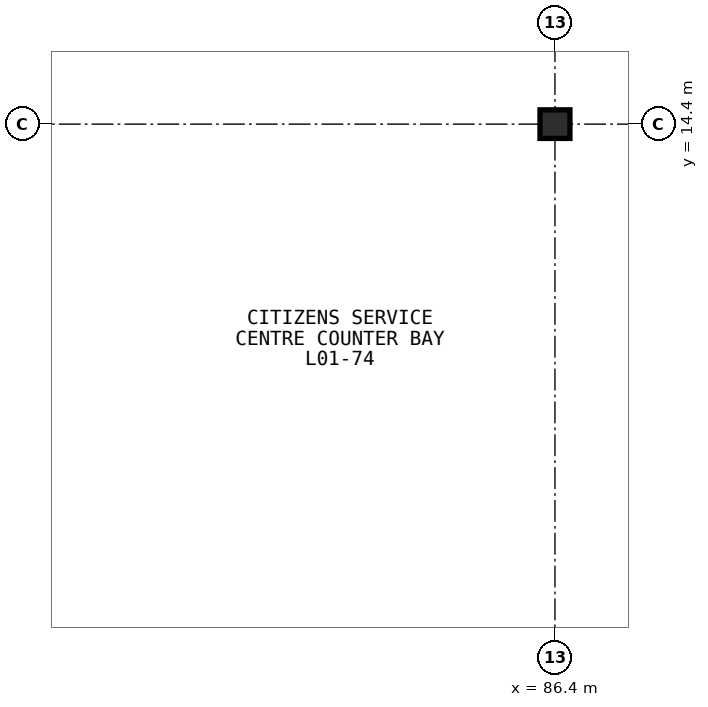
"""IFC4 building model, lengths in metres.
Left out: names, types, materials, properties, quantities, classifications, styles, units other than length and angle.
Written with IfcOpenShell. Run it as: python <this file> out.ifc"""

import sys

from ifc_helpers import new_model, si_unit, direction, frame, origin, origin_2d, place, context, subcontext, project, spatial, i_section, extrude, element, save


model = new_model("IFC4")
c1 = context("Model", 3, precision=1e-05, world=origin(), true_north=direction((0.0, 1.0)))
c2 = subcontext(c1, "Body", "Model", "MODEL_VIEW")
j1 = project(units=[si_unit("LENGTHUNIT", "METRE"), si_unit("PLANEANGLEUNIT", "RADIAN")], contexts=[c1])
p1 = place(None, origin())
s1 = spatial("IfcSite", under=j1, at=p1, CompositionType="ELEMENT")
p2 = place(p1, origin())
s2 = spatial("IfcBuilding", under=s1, at=p2, CompositionType="ELEMENT")
p3 = place(p2, origin())
s3 = spatial("IfcBuildingStorey", under=s2, at=p3, CompositionType="ELEMENT", Elevation=0.0)
p4 = place(p3, frame((86.4, 14.4, 0.0), z_axis=(0.0, 0.0, 1.0), x_axis=(1.0, 0.0, 0.0)))
e1 = element("IfcColumn", 1, at=p4, inside=s3, PredefinedType="COLUMN", context=c2, shape_type="SweptSolid", body=[
    extrude(i_section(OverallWidth=0.394, OverallDepth=0.376, WebThickness=0.017, FlangeThickness=0.028, FilletRadius=0.015, at=origin_2d()), origin(), (0.0, 0.0, 1.0), 5.4),
])
save(model, sys.argv[1])
